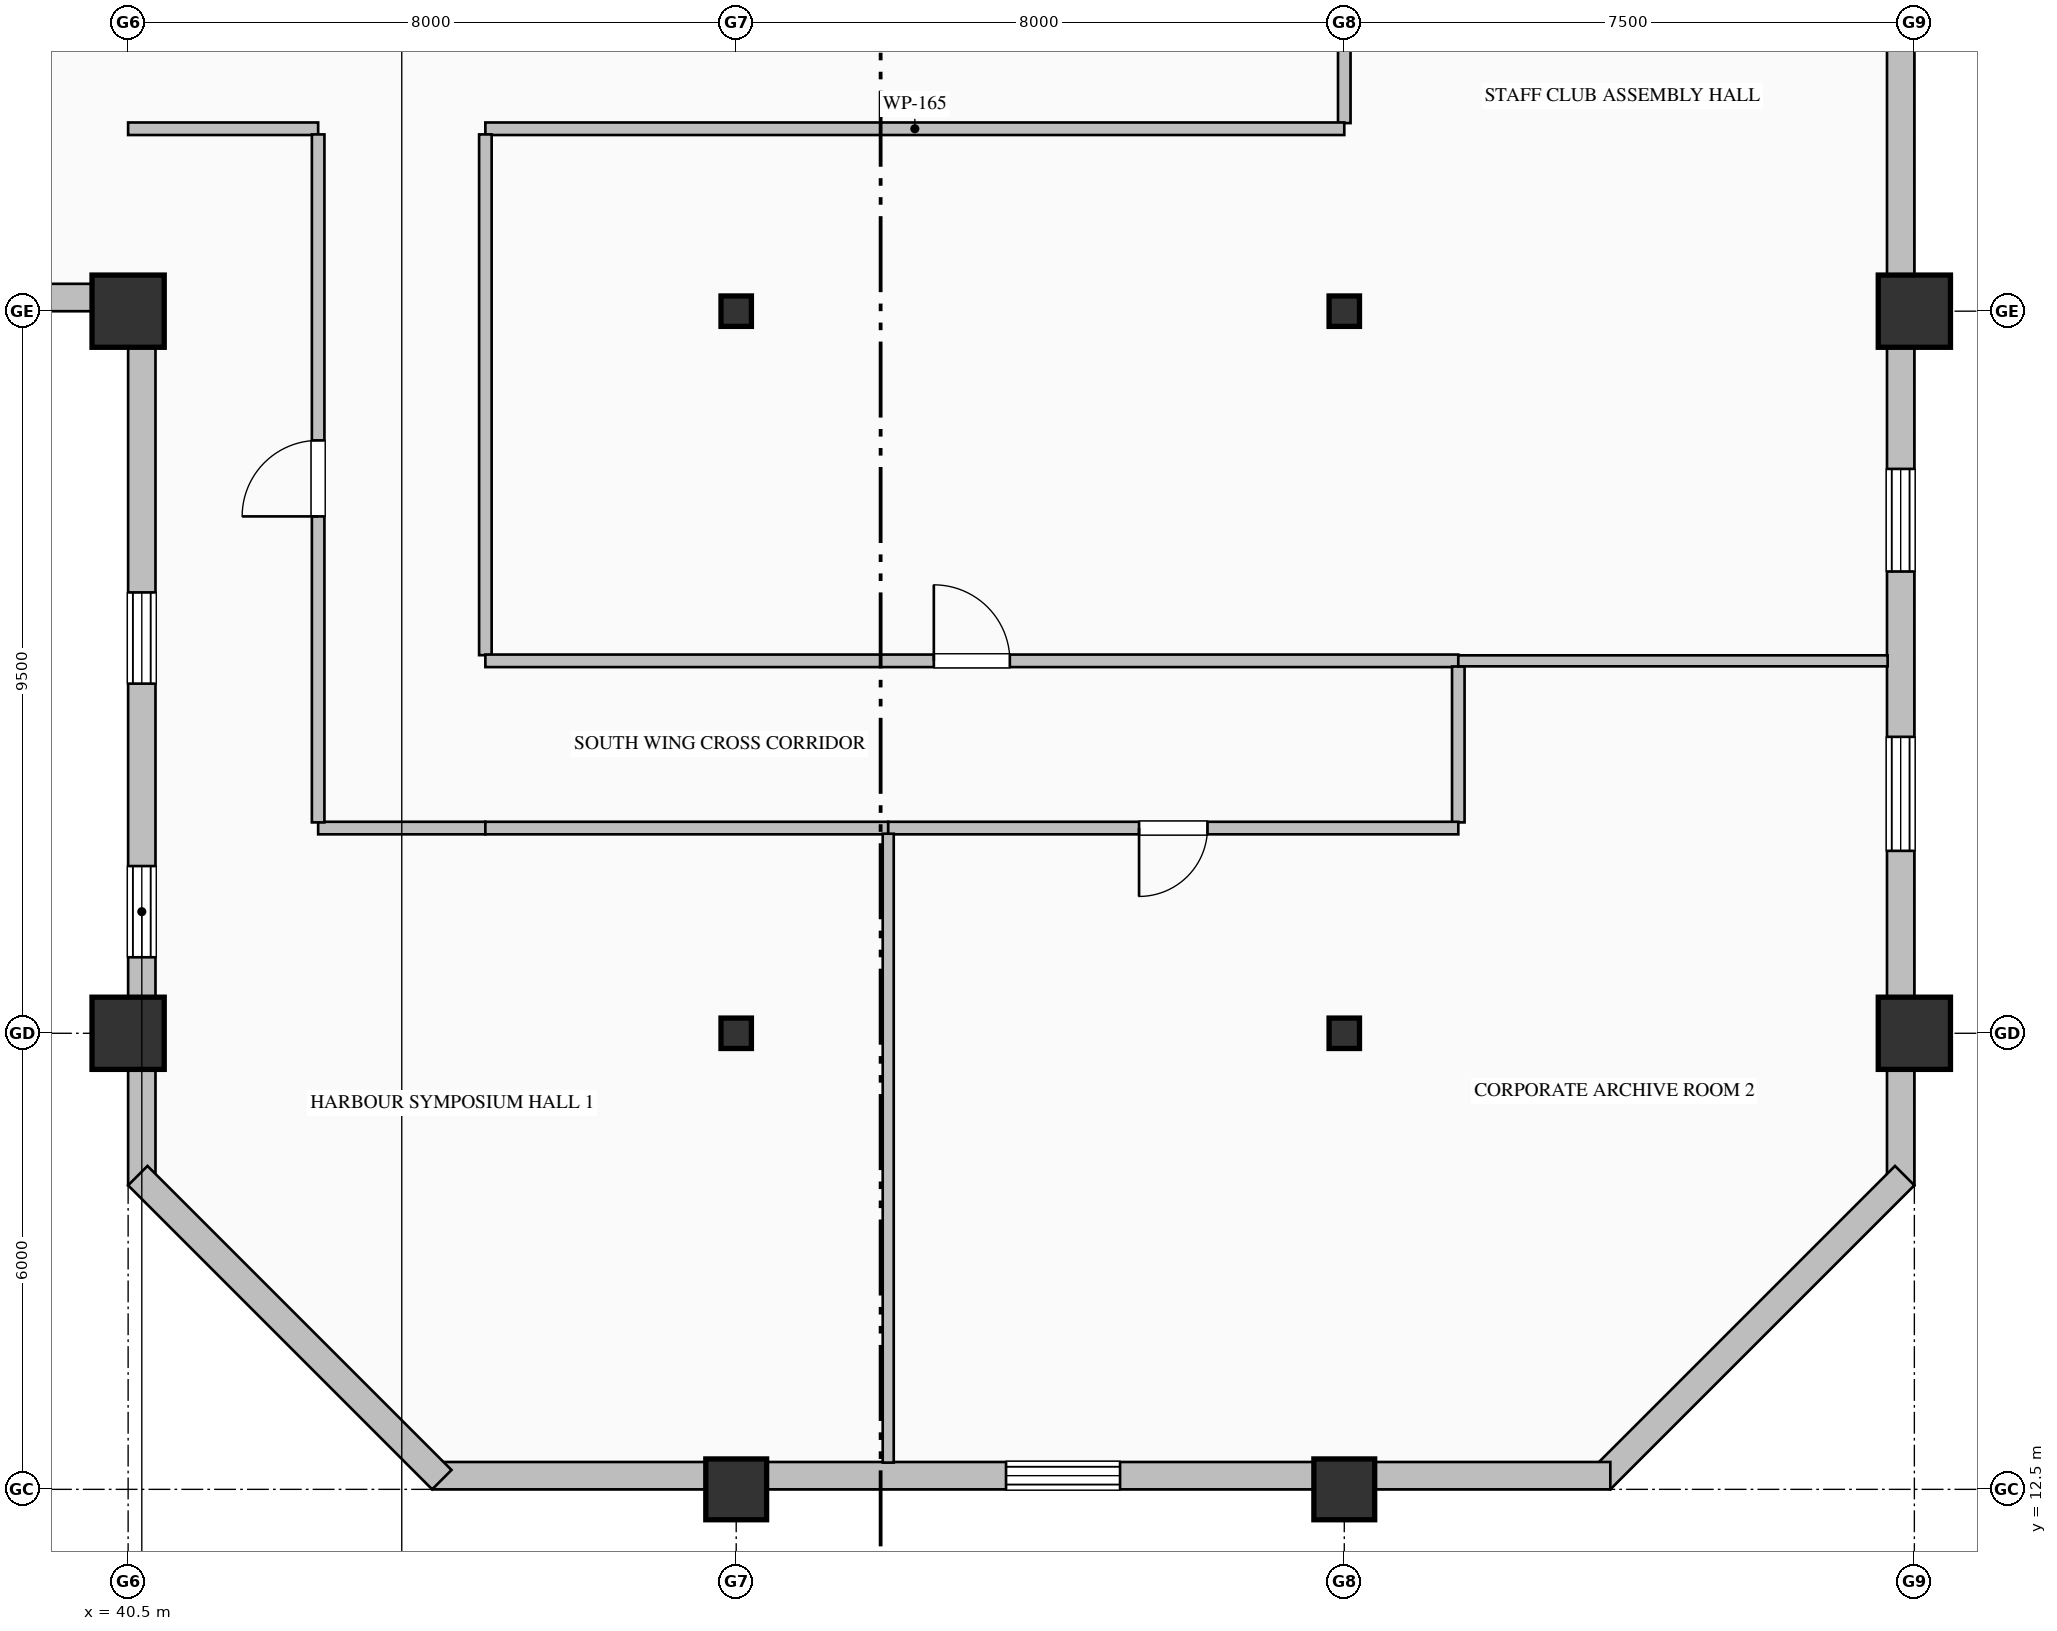
"""IFC4 building model, lengths in metres.
Left out: names, types, materials, properties, quantities, classifications, styles, units other than length and angle.
Written with IfcOpenShell. Run it as: python <this file> out.ifc"""

import sys

from ifc_helpers import new_model, si_unit, direction, frame, frame_2d, origin, origin_2d, place, context, subcontext, project, spatial, rectangle, hollow_rectangle, i_section, extrude, element, fill, save


model = new_model("IFC4")
c1 = context("Model", 3, precision=1e-05, world=origin(), true_north=direction((0.0, 1.0)))
c2 = subcontext(c1, "Body", "Model", "MODEL_VIEW")
j1 = project(units=[si_unit("LENGTHUNIT", "METRE"), si_unit("PLANEANGLEUNIT", "RADIAN")], contexts=[c1])
p1 = place(None, origin())
s1 = spatial("IfcSite", under=j1, at=p1, CompositionType="ELEMENT")
p2 = place(p1, origin())
s2 = spatial("IfcBuilding", under=s1, at=p2, CompositionType="ELEMENT")
p3 = place(p2, frame((0.0, 0.0, 233.8)))
s3 = spatial("IfcBuildingStorey", under=s2, at=p3, CompositionType="ELEMENT", Elevation=233.8)
for number, where, z_axis, x_axis in (
    (1, (40.5, 18.5, 0.0), (0.0, 0.0, 1.0), (1.0, 0.0, 0.0)),
    (2, (40.5, 28.0, 0.0), (0.0, 0.0, 1.0), (1.0, 0.0, 0.0)),
):
    element("IfcColumn", number, at=place(p3, frame(where, z_axis=z_axis, x_axis=x_axis)), inside=s3, PredefinedType="COLUMN", context=c2, shape_type="SweptSolid", body=[
        extrude(hollow_rectangle(XDim=0.95, YDim=0.95, WallThickness=0.036, at=origin_2d()), origin(), (0.0, 0.0, 1.0), 4.0),
    ])
p4 = place(p3, frame((48.5, 12.5, 0.0), z_axis=(0.0, 0.0, 1.0), x_axis=(1.0, 0.0, 0.0)))
e3 = element("IfcColumn", 3, at=p4, inside=s3, PredefinedType="COLUMN", context=c2, shape_type="SweptSolid", body=[
    extrude(hollow_rectangle(XDim=0.8, YDim=0.8, WallThickness=0.032, at=origin_2d()), origin(), (0.0, 0.0, 1.0), 4.0),
])
for number, where, z_axis, x_axis in (
    (4, (48.5, 18.5, 0.0), (0.0, 0.0, 1.0), (1.0, 0.0, 0.0)),
    (5, (48.5, 28.0, 0.0), (0.0, 0.0, 1.0), (1.0, 0.0, 0.0)),
):
    element("IfcColumn", number, at=place(p3, frame(where, z_axis=z_axis, x_axis=x_axis)), inside=s3, PredefinedType="COLUMN", context=c2, shape_type="SweptSolid", body=[
        extrude(i_section(OverallWidth=0.4, OverallDepth=0.4, WebThickness=0.013, FlangeThickness=0.021, FilletRadius=0.022, at=origin_2d()), origin(), (0.0, 0.0, 1.0), 4.0),
    ])
p5 = place(p3, frame((56.5, 12.5, 0.0), z_axis=(0.0, 0.0, 1.0), x_axis=(1.0, 0.0, 0.0)))
e6 = element("IfcColumn", 6, at=p5, inside=s3, PredefinedType="COLUMN", context=c2, shape_type="SweptSolid", body=[
    extrude(hollow_rectangle(XDim=0.8, YDim=0.8, WallThickness=0.032, at=origin_2d()), origin(), (0.0, 0.0, 1.0), 4.0),
])
for number, where, z_axis, x_axis in (
    (7, (56.5, 18.5, 0.0), (0.0, 0.0, 1.0), (1.0, 0.0, 0.0)),
    (8, (56.5, 28.0, 0.0), (0.0, 0.0, 1.0), (1.0, 0.0, 0.0)),
):
    element("IfcColumn", number, at=place(p3, frame(where, z_axis=z_axis, x_axis=x_axis)), inside=s3, PredefinedType="COLUMN", context=c2, shape_type="SweptSolid", body=[
        extrude(i_section(OverallWidth=0.4, OverallDepth=0.4, WebThickness=0.013, FlangeThickness=0.021, FilletRadius=0.022, at=origin_2d()), origin(), (0.0, 0.0, 1.0), 4.0),
    ])
for number, where, z_axis, x_axis in (
    (9, (64.0, 18.5, 0.0), (0.0, 0.0, 1.0), (1.0, 0.0, 0.0)),
    (10, (64.0, 28.0, 0.0), (0.0, 0.0, 1.0), (1.0, 0.0, 0.0)),
):
    element("IfcColumn", number, at=place(p3, frame(where, z_axis=z_axis, x_axis=x_axis)), inside=s3, PredefinedType="COLUMN", context=c2, shape_type="SweptSolid", body=[
        extrude(hollow_rectangle(XDim=0.95, YDim=0.95, WallThickness=0.036, at=origin_2d()), origin(), (0.0, 0.0, 1.0), 4.0),
    ])
p6 = place(p3, frame((40.68, 16.5, 0.0), z_axis=(0.0, 0.0, 1.0), x_axis=(0.0, 1.0, 0.0)))
e11 = element("IfcWall", 11, at=p6, inside=s3, PredefinedType="SOLIDWALL", context=c2, shape_type="SweptSolid", body=[
    extrude(rectangle(XDim=11.86, YDim=0.36, at=frame_2d((5.93, 0.0))), origin(), (0.0, 0.0, 1.0), 3.187),
])
p7 = place(p6, frame((3.0, 0.0, 0.7)))
e12 = element("IfcOpeningElement", 12, at=p7, cuts=e11, PredefinedType="OPENING", context=c2, shape_type="SweptSolid", body=[
    extrude(rectangle(XDim=1.2, YDim=1.85, at=frame_2d((0.6, 0.925))), frame((0.0, 0.19, 0.0), z_axis=(0.0, -1.0, 0.0), x_axis=(1.0, 0.0, 0.0)), (0.0, 0.0, 1.0), 0.38),
])
p8 = place(p6, frame((6.6, 0.0, 0.9)))
e13 = element("IfcOpeningElement", 13, at=p8, cuts=e11, PredefinedType="OPENING", context=c2, shape_type="SweptSolid", body=[
    extrude(rectangle(XDim=1.2, YDim=1.85, at=frame_2d((0.6, 0.925))), frame((0.0, 0.19, 0.0), z_axis=(0.0, -1.0, 0.0), x_axis=(1.0, 0.0, 0.0)), (0.0, 0.0, 1.0), 0.38),
])
p9 = place(p3, frame((40.52, 28.18, 0.0), z_axis=(0.0, 0.0, 1.0), x_axis=(-1.0, 0.0, 0.0)))
e14 = element("IfcWall", 14, at=p9, inside=s3, PredefinedType="SOLIDWALL", context=c2, shape_type="SweptSolid", body=[
    extrude(rectangle(XDim=27.52, YDim=0.36, at=frame_2d((13.76, 0.0))), origin(), (0.0, 0.0, 1.0), 3.187),
])
p10 = place(p9, frame((10.2, 0.0, 0.7)))
e15 = element("IfcOpeningElement", 15, at=p10, cuts=e14, PredefinedType="OPENING", context=c2, shape_type="SweptSolid", body=[
    extrude(rectangle(XDim=1.2, YDim=1.85, at=frame_2d((0.6, 0.925))), frame((0.0, 0.19, 0.0), z_axis=(0.0, -1.0, 0.0), x_axis=(1.0, 0.0, 0.0)), (0.0, 0.0, 1.0), 0.38),
])
p11 = place(p9, frame((13.8, 0.0, 0.9)))
e16 = element("IfcOpeningElement", 16, at=p11, cuts=e14, PredefinedType="OPENING", context=c2, shape_type="SweptSolid", body=[
    extrude(rectangle(XDim=1.2, YDim=1.85, at=frame_2d((0.6, 0.925))), frame((0.0, 0.19, 0.0), z_axis=(0.0, -1.0, 0.0), x_axis=(1.0, 0.0, 0.0)), (0.0, 0.0, 1.0), 0.38),
])
p12 = place(p9, frame((17.325, 0.0, 0.9)))
e17 = element("IfcOpeningElement", 17, at=p12, cuts=e14, PredefinedType="OPENING", context=c2, shape_type="SweptSolid", body=[
    extrude(rectangle(XDim=1.35, YDim=1.85, at=frame_2d((0.675, 0.925))), frame((0.0, 0.19, 0.0), z_axis=(0.0, -1.0, 0.0), x_axis=(1.0, 0.0, 0.0)), (0.0, 0.0, 1.0), 0.38),
])
p13 = place(p9, frame((21.0, 0.0, 0.7)))
e18 = element("IfcOpeningElement", 18, at=p13, cuts=e14, PredefinedType="OPENING", context=c2, shape_type="SweptSolid", body=[
    extrude(rectangle(XDim=1.2, YDim=1.85, at=frame_2d((0.6, 0.925))), frame((0.0, 0.19, 0.0), z_axis=(0.0, -1.0, 0.0), x_axis=(1.0, 0.0, 0.0)), (0.0, 0.0, 1.0), 0.38),
])
p14 = place(p3, frame((63.82, 36.05, 0.0), z_axis=(0.0, 0.0, 1.0), x_axis=(0.0, -1.0, 0.0)))
e19 = element("IfcWall", 19, at=p14, inside=s3, PredefinedType="SOLIDWALL", context=c2, shape_type="SweptSolid", body=[
    extrude(rectangle(XDim=19.55, YDim=0.36, at=frame_2d((9.775, 0.0))), origin(), (0.0, 0.0, 1.0), 3.325),
])
p15 = place(p14, frame((2.85, 0.0, 0.7)))
e20 = element("IfcOpeningElement", 20, at=p15, cuts=e19, PredefinedType="OPENING", context=c2, shape_type="SweptSolid", body=[
    extrude(rectangle(XDim=1.5, YDim=2.4, at=frame_2d((0.75, 1.2))), frame((0.0, 0.19, 0.0), z_axis=(0.0, -1.0, 0.0), x_axis=(1.0, 0.0, 0.0)), (0.0, 0.0, 1.0), 0.38),
])
p16 = place(p14, frame((10.125, 0.0, 0.9)))
e21 = element("IfcOpeningElement", 21, at=p16, cuts=e19, PredefinedType="OPENING", context=c2, shape_type="SweptSolid", body=[
    extrude(rectangle(XDim=1.35, YDim=1.85, at=frame_2d((0.675, 0.925))), frame((0.0, 0.19, 0.0), z_axis=(0.0, -1.0, 0.0), x_axis=(1.0, 0.0, 0.0)), (0.0, 0.0, 1.0), 0.38),
])
p17 = place(p14, frame((13.65, 0.0, 0.7)))
e22 = element("IfcOpeningElement", 22, at=p17, cuts=e19, PredefinedType="OPENING", context=c2, shape_type="SweptSolid", body=[
    extrude(rectangle(XDim=1.5, YDim=2.4, at=frame_2d((0.75, 1.2))), frame((0.0, 0.19, 0.0), z_axis=(0.0, -1.0, 0.0), x_axis=(1.0, 0.0, 0.0)), (0.0, 0.0, 1.0), 0.38),
])
p18 = place(p3, frame((63.873, 16.627, 0.0), z_axis=(0.0, 0.0, 1.0), x_axis=(-0.707106781187, -0.707106781187, 0.0)))
e23 = element("IfcWall", 23, at=p18, inside=s3, PredefinedType="SOLIDWALL", context=c2, shape_type="SweptSolid", body=[
    extrude(rectangle(XDim=5.657, YDim=0.36, at=frame_2d((2.828, 0.0))), origin(), (0.0, 0.0, 1.0), 3.775),
])
p19 = place(p3, frame((60.0, 12.68, 0.0), z_axis=(0.0, 0.0, 1.0), x_axis=(-1.0, 0.0, 0.0)))
e24 = element("IfcWall", 24, at=p19, inside=s3, PredefinedType="SOLIDWALL", context=c2, shape_type="SweptSolid", body=[
    extrude(rectangle(XDim=15.5, YDim=0.36, at=frame_2d((7.75, 0.0))), origin(), (0.0, 0.0, 1.0), 3.325),
])
p20 = place(p19, frame((6.45, 0.0, 0.7)))
e25 = element("IfcOpeningElement", 25, at=p20, cuts=e24, PredefinedType="OPENING", context=c2, shape_type="SweptSolid", body=[
    extrude(rectangle(XDim=1.5, YDim=2.4, at=frame_2d((0.75, 1.2))), frame((0.0, 0.19, 0.0), z_axis=(0.0, -1.0, 0.0), x_axis=(1.0, 0.0, 0.0)), (0.0, 0.0, 1.0), 0.38),
])
p21 = place(p3, frame((44.627, 12.627, 0.0), z_axis=(0.0, 0.0, 1.0), x_axis=(-0.707106781187, 0.707106781187, 0.0)))
e26 = element("IfcWall", 26, at=p21, inside=s3, PredefinedType="SOLIDWALL", context=c2, shape_type="SweptSolid", body=[
    extrude(rectangle(XDim=5.657, YDim=0.36, at=frame_2d((2.828, 0.0))), origin(), (0.0, 0.0, 1.0), 3.775),
])
p22 = place(p3, frame((56.5, 36.0, 0.0), z_axis=(0.0, 0.0, 1.0), x_axis=(0.0, -1.0, 0.0)))
e27 = element("IfcWall", 27, at=p22, inside=s3, PredefinedType="PARTITIONING", context=c2, shape_type="SweptSolid", body=[
    extrude(rectangle(XDim=5.525, YDim=0.165, at=frame_2d((2.763, 0.0))), origin(), (0.0, 0.0, 1.0), 3.179),
])
p23 = place(p3, frame((56.5, 30.4, 0.0), z_axis=(0.0, 0.0, 1.0), x_axis=(-1.0, 0.0, 0.0)))
e28 = element("IfcWall", 28, at=p23, inside=s3, PredefinedType="PARTITIONING", context=c2, shape_type="SweptSolid", body=[
    extrude(rectangle(XDim=11.3, YDim=0.165, at=frame_2d((5.65, 0.0))), origin(), (0.0, 0.0, 1.0), 3.775),
])
p24 = place(p3, frame((43.0, 30.4, 0.0), z_axis=(0.0, 0.0, 1.0), x_axis=(-1.0, 0.0, 0.0)))
e29 = element("IfcWall", 29, at=p24, inside=s3, PredefinedType="PARTITIONING", context=c2, shape_type="SweptSolid", body=[
    extrude(rectangle(XDim=2.5, YDim=0.165, at=frame_2d((1.25, 0.0))), origin(), (0.0, 0.0, 1.0), 3.775),
])
p25 = place(p3, frame((45.2, 30.325, 0.0), z_axis=(0.0, 0.0, 1.0), x_axis=(0.0, -1.0, 0.0)))
e30 = element("IfcWall", 30, at=p25, inside=s3, PredefinedType="PARTITIONING", context=c2, shape_type="SweptSolid", body=[
    extrude(rectangle(XDim=6.851, YDim=0.165, at=frame_2d((3.425, 0.0))), origin(), (0.0, 0.0, 1.0), 3.775),
])
p26 = place(p3, frame((45.2, 21.2, 0.0), z_axis=(0.0, 0.0, 1.0), x_axis=(-1.0, 0.0, 0.0)))
e31 = element("IfcWall", 31, at=p26, inside=s3, PredefinedType="PARTITIONING", context=c2, shape_type="SweptSolid", body=[
    extrude(rectangle(XDim=2.2, YDim=0.165, at=frame_2d((1.1, 0.0))), origin(), (0.0, 0.0, 1.0), 3.775),
])
p27 = place(p3, frame((43.0, 21.274, 0.0), z_axis=(0.0, 0.0, 1.0), x_axis=(0.0, 1.0, 0.0)))
e32 = element("IfcWall", 32, at=p27, inside=s3, PredefinedType="PARTITIONING", context=c2, shape_type="SweptSolid", body=[
    extrude(rectangle(XDim=9.051, YDim=0.165, at=frame_2d((4.525, 0.0))), origin(), (0.0, 0.0, 1.0), 3.775),
])
p28 = place(p27, frame((4.025, 0.0, 0.0)))
e33 = element("IfcOpeningElement", 33, at=p28, cuts=e32, PredefinedType="OPENING", context=c2, shape_type="SweptSolid", body=[
    extrude(rectangle(XDim=1.0, YDim=2.15, at=frame_2d((0.5, 1.075))), frame((0.0, 0.093, 0.0), z_axis=(0.0, -1.0, 0.0), x_axis=(1.0, 0.0, 0.0)), (0.0, 0.0, 1.0), 0.185),
])
p29 = place(p3, frame((45.2, 23.4, 0.0), z_axis=(0.0, 0.0, 1.0), x_axis=(1.0, 0.0, 0.0)))
e34 = element("IfcWall", 34, at=p29, inside=s3, PredefinedType="PARTITIONING", context=c2, shape_type="SweptSolid", body=[
    extrude(rectangle(XDim=12.8, YDim=0.165, at=frame_2d((6.4, 0.0))), origin(), (0.0, 0.0, 1.0), 3.467),
])
p30 = place(p29, frame((5.9, 0.0, 0.0)))
e35 = element("IfcOpeningElement", 35, at=p30, cuts=e34, PredefinedType="OPENING", context=c2, shape_type="SweptSolid", body=[
    extrude(rectangle(XDim=1.0, YDim=2.15, at=frame_2d((0.5, 1.075))), frame((0.0, 0.093, 0.0), z_axis=(0.0, -1.0, 0.0), x_axis=(1.0, 0.0, 0.0)), (0.0, 0.0, 1.0), 0.185),
])
p31 = place(p3, frame((50.5, 21.2, 0.0), z_axis=(0.0, 0.0, 1.0), x_axis=(-1.0, 0.0, 0.0)))
e36 = element("IfcWall", 36, at=p31, inside=s3, PredefinedType="PARTITIONING", context=c2, shape_type="SweptSolid", body=[
    extrude(rectangle(XDim=5.3, YDim=0.165, at=frame_2d((2.65, 0.0))), origin(), (0.0, 0.0, 1.0), 3.775),
])
p32 = place(p3, frame((58.0, 23.325, 0.0), z_axis=(0.0, 0.0, 1.0), x_axis=(0.0, -1.0, 0.0)))
e37 = element("IfcWall", 37, at=p32, inside=s3, PredefinedType="PARTITIONING", context=c2, shape_type="SweptSolid", body=[
    extrude(rectangle(XDim=2.051, YDim=0.165, at=frame_2d((1.025, 0.0))), origin(), (0.0, 0.0, 1.0), 3.775),
])
p33 = place(p3, frame((58.0, 21.2, 0.0), z_axis=(0.0, 0.0, 1.0), x_axis=(-1.0, 0.0, 0.0)))
e38 = element("IfcWall", 38, at=p33, inside=s3, PredefinedType="PARTITIONING", context=c2, shape_type="SweptSolid", body=[
    extrude(rectangle(XDim=7.5, YDim=0.165, at=frame_2d((3.75, 0.0))), origin(), (0.0, 0.0, 1.0), 3.775),
])
p34 = place(p33, frame((3.3, 0.0, 0.0)))
e39 = element("IfcOpeningElement", 39, at=p34, cuts=e38, PredefinedType="OPENING", context=c2, shape_type="SweptSolid", body=[
    extrude(rectangle(XDim=0.9, YDim=2.15, at=frame_2d((0.45, 1.075))), frame((0.0, 0.093, 0.0), z_axis=(0.0, -1.0, 0.0), x_axis=(1.0, 0.0, 0.0)), (0.0, 0.0, 1.0), 0.185),
])
p35 = place(p3, frame((63.648, 23.4, 0.0), z_axis=(0.0, 0.0, 1.0), x_axis=(-1.0, 0.0, 0.0)))
e40 = element("IfcWall", 40, at=p35, inside=s3, PredefinedType="PARTITIONING", context=c2, shape_type="SweptSolid", body=[
    extrude(rectangle(XDim=5.648, YDim=0.145, at=frame_2d((2.824, 0.0))), origin(), (0.0, 0.0, 1.0), 3.775),
])
p36 = place(p3, frame((50.5, 21.125, 0.0), z_axis=(0.0, 0.0, 1.0), x_axis=(0.0, -1.0, 0.0)))
e41 = element("IfcWall", 41, at=p36, inside=s3, PredefinedType="PARTITIONING", context=c2, shape_type="SweptSolid", body=[
    extrude(rectangle(XDim=8.273, YDim=0.145, at=frame_2d((4.137, 0.0))), origin(), (0.0, 0.0, 1.0), 3.775),
])
p37 = place(p7, origin())
e42 = element("IfcWindow", 42, at=p37, inside=s3, PartitioningType="DOUBLE_PANEL_VERTICAL", PredefinedType="WINDOW", context=c2, shape_type="SweptSolid", body=[
    extrude(rectangle(XDim=1.2, YDim=1.85, at=frame_2d((0.6, 0.925))), frame((0.0, 0.15, 0.0), z_axis=(0.0, -1.0, 0.0), x_axis=(1.0, 0.0, 0.0)), (0.0, 0.0, 1.0), 0.06),
])
fill(e12, e42)
p38 = place(p8, origin())
e43 = element("IfcWindow", 43, at=p38, inside=s3, PartitioningType="DOUBLE_PANEL_VERTICAL", PredefinedType="WINDOW", context=c2, shape_type="SweptSolid", body=[
    extrude(rectangle(XDim=1.2, YDim=1.85, at=frame_2d((0.6, 0.925))), frame((0.0, 0.15, 0.0), z_axis=(0.0, -1.0, 0.0), x_axis=(1.0, 0.0, 0.0)), (0.0, 0.0, 1.0), 0.06),
])
fill(e13, e43)
p39 = place(p16, origin())
e44 = element("IfcWindow", 44, at=p39, inside=s3, PartitioningType="DOUBLE_PANEL_VERTICAL", PredefinedType="WINDOW", context=c2, shape_type="SweptSolid", body=[
    extrude(rectangle(XDim=1.35, YDim=1.85, at=frame_2d((0.675, 0.925))), frame((0.0, 0.15, 0.0), z_axis=(0.0, -1.0, 0.0), x_axis=(1.0, 0.0, 0.0)), (0.0, 0.0, 1.0), 0.06),
])
fill(e21, e44)
p40 = place(p17, origin())
e45 = element("IfcWindow", 45, at=p40, inside=s3, PartitioningType="DOUBLE_PANEL_HORIZONTAL", PredefinedType="WINDOW", context=c2, shape_type="SweptSolid", body=[
    extrude(rectangle(XDim=1.5, YDim=2.4, at=frame_2d((0.75, 1.2))), frame((0.0, 0.15, 0.0), z_axis=(0.0, -1.0, 0.0), x_axis=(1.0, 0.0, 0.0)), (0.0, 0.0, 1.0), 0.06),
])
fill(e22, e45)
p41 = place(p20, origin())
e46 = element("IfcWindow", 46, at=p41, inside=s3, PartitioningType="DOUBLE_PANEL_HORIZONTAL", PredefinedType="WINDOW", context=c2, shape_type="SweptSolid", body=[
    extrude(rectangle(XDim=1.5, YDim=2.4, at=frame_2d((0.75, 1.2))), frame((0.0, 0.15, 0.0), z_axis=(0.0, -1.0, 0.0), x_axis=(1.0, 0.0, 0.0)), (0.0, 0.0, 1.0), 0.06),
])
fill(e25, e46)
p42 = place(p30, origin())
e47 = element("IfcDoor", 47, at=p42, inside=s3, OperationType="SINGLE_SWING_LEFT", PredefinedType="DOOR", context=c2, shape_type="SweptSolid", body=[
    extrude(rectangle(XDim=1.0, YDim=2.15, at=frame_2d((0.5, 1.075))), frame((0.0, 0.025, 0.0), z_axis=(0.0, -1.0, 0.0), x_axis=(1.0, 0.0, 0.0)), (0.0, 0.0, 1.0), 0.05),
])
fill(e35, e47)
p43 = place(p28, origin())
e48 = element("IfcDoor", 48, at=p43, inside=s3, OperationType="SINGLE_SWING_LEFT", PredefinedType="DOOR", context=c2, shape_type="SweptSolid", body=[
    extrude(rectangle(XDim=1.0, YDim=2.15, at=frame_2d((0.5, 1.075))), frame((0.0, 0.025, 0.0), z_axis=(0.0, -1.0, 0.0), x_axis=(1.0, 0.0, 0.0)), (0.0, 0.0, 1.0), 0.05),
])
fill(e33, e48)
p44 = place(p34, origin())
e49 = element("IfcDoor", 49, at=p44, inside=s3, OperationType="SINGLE_SWING_RIGHT", PredefinedType="DOOR", context=c2, shape_type="SweptSolid", body=[
    extrude(rectangle(XDim=0.9, YDim=2.15, at=frame_2d((0.45, 1.075))), frame((0.0, 0.025, 0.0), z_axis=(0.0, -1.0, 0.0), x_axis=(1.0, 0.0, 0.0)), (0.0, 0.0, 1.0), 0.05),
])
fill(e39, e49)
save(model, sys.argv[1])
